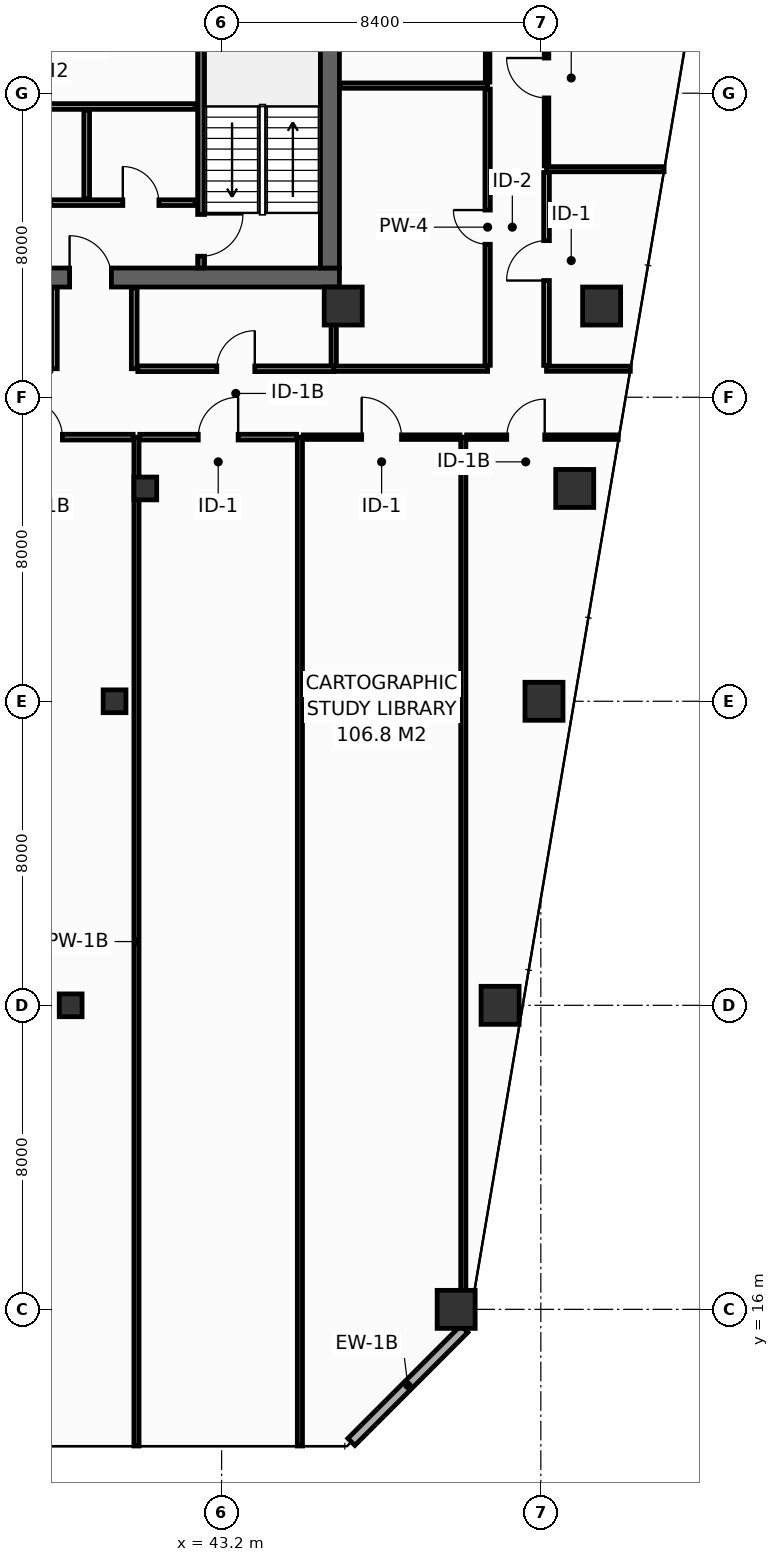
"""IFC4 building model, lengths in metres.
Left out: names, types, materials, properties, quantities, classifications, styles, units other than length and angle.
Written with IfcOpenShell. Run it as: python <this file> out.ifc"""

import sys

from ifc_helpers import new_model, si_unit, direction, frame, frame_2d, origin, origin_2d, place, context, subcontext, project, spatial, rectangle, hollow_rectangle, extrude, element, fill, save


model = new_model("IFC4")
c1 = context("Model", 3, precision=1e-05, world=origin(), true_north=direction((0.0, 1.0)))
c2 = subcontext(c1, "Body", "Model", "MODEL_VIEW")
j1 = project(units=[si_unit("LENGTHUNIT", "METRE"), si_unit("PLANEANGLEUNIT", "RADIAN")], contexts=[c1])
p1 = place(None, origin())
s1 = spatial("IfcSite", under=j1, at=p1, CompositionType="ELEMENT")
p2 = place(p1, origin())
s2 = spatial("IfcBuilding", under=s1, at=p2, CompositionType="ELEMENT")
p3 = place(p2, frame((0.0, 0.0, 175.2)))
s3 = spatial("IfcBuildingStorey", under=s2, at=p3, CompositionType="ELEMENT", Elevation=175.2)
p4 = place(p3, frame((13.6, 43.15, 0.0), z_axis=(0.0, 0.0, 1.0), x_axis=(1.0, 0.0, 0.0)))
e1 = element("IfcWall", 1, at=p4, inside=s3, PredefinedType="SHEAR", context=c2, shape_type="SweptSolid", body=[
    extrude(rectangle(XDim=32.7, YDim=0.5, at=frame_2d((16.35, 0.0))), origin(), (0.0, 0.0, 1.0), 3.55),
])
p5 = place(p4, frame((5.4, 0.0, 0.0)))
e2 = element("IfcOpeningElement", 2, at=p5, cuts=e1, PredefinedType="OPENING", context=c2, shape_type="SweptSolid", body=[
    extrude(rectangle(XDim=1.1, YDim=2.15, at=frame_2d((0.55, 1.075))), frame((0.0, 0.26, 0.0), z_axis=(0.0, -1.0, 0.0), x_axis=(1.0, 0.0, 0.0)), (0.0, 0.0, 1.0), 0.52),
])
p6 = place(p4, frame((25.6, 0.0, 0.0)))
e3 = element("IfcOpeningElement", 3, at=p6, cuts=e1, PredefinedType="OPENING", context=c2, shape_type="SweptSolid", body=[
    extrude(rectangle(XDim=1.1, YDim=2.15, at=frame_2d((0.55, 1.075))), frame((0.0, 0.26, 0.0), z_axis=(0.0, -1.0, 0.0), x_axis=(1.0, 0.0, 0.0)), (0.0, 0.0, 1.0), 0.52),
])
p7 = place(p3, frame((46.05, 43.4, 0.0), z_axis=(0.0, 0.0, 1.0), x_axis=(0.0, 1.0, 0.0)))
e4 = element("IfcWall", 4, at=p7, inside=s3, PredefinedType="SHEAR", context=c2, shape_type="SweptSolid", body=[
    extrude(rectangle(XDim=10.4, YDim=0.5, at=frame_2d((5.2, 0.0))), origin(), (0.0, 0.0, 1.0), 3.55),
])
for number, where, z_axis, x_axis in (
    (5, (46.4, 42.4, 0.0), (0.0, 0.0, 1.0), (1.0, 0.0, 0.0)),
    (6, (53.2, 42.4, 0.0), (0.0, 0.0, 1.0), (1.0, 0.0, 0.0)),
    (7, (49.372, 16.0, 0.0), (0.0, 0.0, 1.0), (1.0, 0.0, 0.0)),
    (8, (50.528, 24.0, 0.0), (0.0, 0.0, 1.0), (1.0, 0.0, 0.0)),
):
    element("IfcColumn", number, at=place(p3, frame(where, z_axis=z_axis, x_axis=x_axis)), inside=s3, PredefinedType="COLUMN", context=c2, shape_type="SweptSolid", body=[
        extrude(hollow_rectangle(XDim=1.0, YDim=1.0, WallThickness=0.045, at=origin_2d()), origin(), (0.0, 0.0, 1.0), 3.8),
    ])
p8 = place(p3, frame((39.228, 24.0, 0.0), z_axis=(0.0, 0.0, 1.0), x_axis=(1.0, 0.0, 0.0)))
e9 = element("IfcColumn", 9, at=p8, inside=s3, PredefinedType="COLUMN", context=c2, shape_type="SweptSolid", body=[
    extrude(hollow_rectangle(XDim=0.6, YDim=0.6, WallThickness=0.028, at=origin_2d()), origin(), (0.0, 0.0, 1.0), 3.8),
])
p9 = place(p3, frame((51.683, 32.0, 0.0), z_axis=(0.0, 0.0, 1.0), x_axis=(1.0, 0.0, 0.0)))
e10 = element("IfcColumn", 10, at=p9, inside=s3, PredefinedType="COLUMN", context=c2, shape_type="SweptSolid", body=[
    extrude(hollow_rectangle(XDim=1.0, YDim=1.0, WallThickness=0.045, at=origin_2d()), origin(), (0.0, 0.0, 1.0), 3.8),
])
p10 = place(p3, frame((40.383, 32.0, 0.0), z_axis=(0.0, 0.0, 1.0), x_axis=(1.0, 0.0, 0.0)))
e11 = element("IfcColumn", 11, at=p10, inside=s3, PredefinedType="COLUMN", context=c2, shape_type="SweptSolid", body=[
    extrude(hollow_rectangle(XDim=0.6, YDim=0.6, WallThickness=0.028, at=origin_2d()), origin(), (0.0, 0.0, 1.0), 3.8),
])
p11 = place(p3, frame((52.492, 37.6, 0.0), z_axis=(0.0, 0.0, 1.0), x_axis=(1.0, 0.0, 0.0)))
e12 = element("IfcColumn", 12, at=p11, inside=s3, PredefinedType="COLUMN", context=c2, shape_type="SweptSolid", body=[
    extrude(hollow_rectangle(XDim=1.0, YDim=1.0, WallThickness=0.045, at=origin_2d()), origin(), (0.0, 0.0, 1.0), 3.8),
])
p12 = place(p3, frame((41.192, 37.6, 0.0), z_axis=(0.0, 0.0, 1.0), x_axis=(1.0, 0.0, 0.0)))
e13 = element("IfcColumn", 13, at=p12, inside=s3, PredefinedType="COLUMN", context=c2, shape_type="SweptSolid", body=[
    extrude(hollow_rectangle(XDim=0.6, YDim=0.6, WallThickness=0.028, at=origin_2d()), origin(), (0.0, 0.0, 1.0), 3.8),
])
p13 = place(p3, frame((42.66, 53.8, 0.0), z_axis=(0.0, 0.0, 1.0), x_axis=(0.0, -1.0, 0.0)))
e14 = element("IfcWall", 14, at=p13, inside=s3, PredefinedType="SHEAR", context=c2, shape_type="SweptSolid", body=[
    extrude(rectangle(XDim=10.4, YDim=0.18, at=frame_2d((5.2, 0.0))), origin(), (0.0, 0.0, 1.0), 3.55),
])
p14 = place(p13, frame((8.99, 0.0, 0.0)))
e15 = element("IfcOpeningElement", 15, at=p14, cuts=e14, PredefinedType="OPENING", context=c2, shape_type="SweptSolid", body=[
    extrude(rectangle(XDim=1.1, YDim=2.15, at=frame_2d((0.55, 1.075))), frame((0.0, 0.1, 0.0), z_axis=(0.0, -1.0, 0.0), x_axis=(1.0, 0.0, 0.0)), (0.0, 0.0, 1.0), 0.2),
])
p15 = place(p3, frame((33.95, 45.12, 0.0), z_axis=(0.0, 0.0, 1.0), x_axis=(1.0, 0.0, 0.0)))
e16 = element("IfcWall", 16, at=p15, inside=s3, PredefinedType="PARTITIONING", context=c2, shape_type="SweptSolid", body=[
    extrude(rectangle(XDim=8.55, YDim=0.15, at=frame_2d((4.275, 0.0))), origin(), (0.0, 0.0, 1.0), 3.55),
])
p16 = place(p15, frame((0.95, 0.0, 0.0)))
e17 = element("IfcOpeningElement", 17, at=p16, cuts=e16, PredefinedType="OPENING", context=c2, shape_type="SweptSolid", body=[
    extrude(rectangle(XDim=0.95, YDim=2.15, at=frame_2d((0.475, 1.075))), frame((0.0, 0.085, 0.0), z_axis=(0.0, -1.0, 0.0), x_axis=(1.0, 0.0, 0.0)), (0.0, 0.0, 1.0), 0.17),
])
p17 = place(p15, frame((3.8, 0.0, 0.0)))
e18 = element("IfcOpeningElement", 18, at=p17, cuts=e16, PredefinedType="OPENING", context=c2, shape_type="SweptSolid", body=[
    extrude(rectangle(XDim=0.95, YDim=2.15, at=frame_2d((0.475, 1.075))), frame((0.0, 0.085, 0.0), z_axis=(0.0, -1.0, 0.0), x_axis=(1.0, 0.0, 0.0)), (0.0, 0.0, 1.0), 0.17),
])
p18 = place(p15, frame((6.65, 0.0, 0.0)))
e19 = element("IfcOpeningElement", 19, at=p18, cuts=e16, PredefinedType="OPENING", context=c2, shape_type="SweptSolid", body=[
    extrude(rectangle(XDim=0.95, YDim=2.15, at=frame_2d((0.475, 1.075))), frame((0.0, 0.085, 0.0), z_axis=(0.0, -1.0, 0.0), x_axis=(1.0, 0.0, 0.0)), (0.0, 0.0, 1.0), 0.17),
])
p19 = place(p3, frame((33.95, 47.65, 0.0), z_axis=(0.0, 0.0, 1.0), x_axis=(1.0, 0.0, 0.0)))
e20 = element("IfcWall", 20, at=p19, inside=s3, PredefinedType="PARTITIONING", context=c2, shape_type="SweptSolid", body=[
    extrude(rectangle(XDim=8.55, YDim=0.15, at=frame_2d((4.275, 0.0))), origin(), (0.0, 0.0, 1.0), 3.55),
])
p20 = place(p3, frame((39.65, 45.22, 0.0), z_axis=(0.0, 0.0, 1.0), x_axis=(0.0, 1.0, 0.0)))
e21 = element("IfcWall", 21, at=p20, inside=s3, PredefinedType="PARTITIONING", context=c2, shape_type="SweptSolid", body=[
    extrude(rectangle(XDim=2.33, YDim=0.15, at=frame_2d((1.165, 0.0))), origin(), (0.0, 0.0, 1.0), 3.55),
])
p21 = place(p3, frame((46.615, 12.513, 0.0), z_axis=(0.0, 0.0, 1.0), x_axis=(0.707135806771, 0.70707775441, 0.0)))
e22 = element("IfcWall", 22, at=p21, inside=s3, PredefinedType="STANDARD", context=c2, shape_type="SweptSolid", body=[
    extrude(rectangle(XDim=4.206, YDim=0.26, at=frame_2d((2.103, 0.0))), origin(), (0.0, 0.0, 1.0), 3.55),
])
p22 = place(p3, frame((46.15, 40.75, 0.0), z_axis=(0.0, 0.0, 1.0), x_axis=(1.0, 0.0, 0.0)))
e23 = element("IfcWall", 23, at=p22, inside=s3, PredefinedType="PARTITIONING", context=c2, shape_type="SweptSolid", body=[
    extrude(rectangle(XDim=4.05, YDim=0.14, at=frame_2d((2.025, 0.0))), origin(), (0.0, 0.0, 1.0), 3.55),
])
p23 = place(p3, frame((46.15, 40.84, 0.0), z_axis=(0.0, 0.0, 1.0), x_axis=(0.0, 1.0, 0.0)))
e24 = element("IfcWall", 24, at=p23, inside=s3, PredefinedType="PARTITIONING", context=c2, shape_type="SweptSolid", body=[
    extrude(rectangle(XDim=2.04, YDim=0.14, at=frame_2d((1.02, 0.0))), origin(), (0.0, 0.0, 1.0), 3.55),
])
p24 = place(p3, frame((46.32, 48.2, 0.0), z_axis=(0.0, 0.0, 1.0), x_axis=(1.0, 0.0, 0.0)))
e25 = element("IfcWall", 25, at=p24, inside=s3, PredefinedType="PARTITIONING", context=c2, shape_type="SweptSolid", body=[
    extrude(rectangle(XDim=3.88, YDim=0.14, at=frame_2d((1.94, 0.0))), origin(), (0.0, 0.0, 1.0), 3.55),
])
p25 = place(p3, frame((50.2, 40.84, 0.0), z_axis=(0.0, 0.0, 1.0), x_axis=(0.0, 1.0, 0.0)))
e26 = element("IfcWall", 26, at=p25, inside=s3, PredefinedType="PARTITIONING", context=c2, shape_type="SweptSolid", body=[
    extrude(rectangle(XDim=7.27, YDim=0.14, at=frame_2d((3.635, 0.0))), origin(), (0.0, 0.0, 1.0), 2.835),
])
p26 = place(p25, frame((3.185, 0.0, 0.0)))
e27 = element("IfcOpeningElement", 27, at=p26, cuts=e26, PredefinedType="OPENING", context=c2, shape_type="SweptSolid", body=[
    extrude(rectangle(XDim=0.9, YDim=2.1, at=frame_2d((0.45, 1.05))), frame((0.0, 0.08, 0.0), z_axis=(0.0, -1.0, 0.0), x_axis=(1.0, 0.0, 0.0)), (0.0, 0.0, 1.0), 0.16),
])
p27 = place(p3, frame((50.2, 48.29, 0.0), z_axis=(0.0, 0.0, 1.0), x_axis=(0.0, 1.0, 0.0)))
e28 = element("IfcWall", 28, at=p27, inside=s3, PredefinedType="PARTITIONING", context=c2, shape_type="SweptSolid", body=[
    extrude(rectangle(XDim=3.98, YDim=0.12, at=frame_2d((1.99, 0.0))), origin(), (0.0, 0.0, 1.0), 3.55),
])
p28 = place(p27, frame((1.54, 0.0, 0.0)))
e29 = element("IfcOpeningElement", 29, at=p28, cuts=e28, PredefinedType="OPENING", context=c2, shape_type="SweptSolid", body=[
    extrude(rectangle(XDim=0.9, YDim=2.1, at=frame_2d((0.45, 1.05))), frame((0.0, 0.07, 0.0), z_axis=(0.0, -1.0, 0.0), x_axis=(1.0, 0.0, 0.0)), (0.0, 0.0, 1.0), 0.14),
])
p29 = place(p3, frame((51.75, 40.75, 0.0), z_axis=(0.0, 0.0, 1.0), x_axis=(1.0, 0.0, 0.0)))
e30 = element("IfcWall", 30, at=p29, inside=s3, PredefinedType="PARTITIONING", context=c2, shape_type="SweptSolid", body=[
    extrude(rectangle(XDim=2.205, YDim=0.135, at=frame_2d((1.103, 0.0))), origin(), (0.0, 0.0, 1.0), 3.035),
])
p30 = place(p3, frame((51.75, 46.0, 0.0), z_axis=(0.0, 0.0, 1.0), x_axis=(1.0, 0.0, 0.0)))
e31 = element("IfcWall", 31, at=p30, inside=s3, PredefinedType="PARTITIONING", context=c2, shape_type="SweptSolid", body=[
    extrude(rectangle(XDim=3.094, YDim=0.135, at=frame_2d((1.547, 0.0))), origin(), (0.0, 0.0, 1.0), 2.835),
])
p31 = place(p3, frame((51.75, 40.837, 0.0), z_axis=(0.0, 0.0, 1.0), x_axis=(0.0, 1.0, 0.0)))
e32 = element("IfcWall", 32, at=p31, inside=s3, PredefinedType="PARTITIONING", context=c2, shape_type="SweptSolid", body=[
    extrude(rectangle(XDim=5.075, YDim=0.15, at=frame_2d((2.538, 0.0))), origin(), (0.0, 0.0, 1.0), 2.835),
])
p32 = place(p31, frame((2.233, 0.0, 0.0)))
e33 = element("IfcOpeningElement", 33, at=p32, cuts=e32, PredefinedType="OPENING", context=c2, shape_type="SweptSolid", body=[
    extrude(rectangle(XDim=1.05, YDim=2.15, at=frame_2d((0.525, 1.075))), frame((0.0, 0.085, 0.0), z_axis=(0.0, -1.0, 0.0), x_axis=(1.0, 0.0, 0.0)), (0.0, 0.0, 1.0), 0.17),
])
p33 = place(p3, frame((51.75, 46.087, 0.0), z_axis=(0.0, 0.0, 1.0), x_axis=(0.0, 1.0, 0.0)))
e34 = element("IfcWall", 34, at=p33, inside=s3, PredefinedType="PARTITIONING", context=c2, shape_type="SweptSolid", body=[
    extrude(rectangle(XDim=4.625, YDim=0.12, at=frame_2d((2.312, 0.0))), origin(), (0.0, 0.0, 1.0), 3.55),
])
p34 = place(p33, frame((1.788, 0.0, 0.0)))
e35 = element("IfcOpeningElement", 35, at=p34, cuts=e34, PredefinedType="OPENING", context=c2, shape_type="SweptSolid", body=[
    extrude(rectangle(XDim=1.05, YDim=2.15, at=frame_2d((0.525, 1.075))), frame((0.0, 0.07, 0.0), z_axis=(0.0, -1.0, 0.0), x_axis=(1.0, 0.0, 0.0)), (0.0, 0.0, 1.0), 0.14),
])
for number, where, z_axis, x_axis in (
    (36, (38.8, 40.75, 0.0), (0.0, 0.0, 1.0), (0.0, 1.0, 0.0)),
    (37, (40.9, 40.75, 0.0), (0.0, 0.0, 1.0), (0.0, 1.0, 0.0)),
):
    element("IfcWall", number, at=place(p3, frame(where, z_axis=z_axis, x_axis=x_axis)), inside=s3, PredefinedType="PARTITIONING", context=c2, shape_type="SweptSolid", body=[
        extrude(rectangle(XDim=2.13, YDim=0.15, at=frame_2d((1.065, 0.0))), origin(), (0.0, 0.0, 1.0), 3.55),
    ])
p35 = place(p3, frame((40.995, 40.75, 0.0), z_axis=(0.0, 0.0, 1.0), x_axis=(1.0, 0.0, 0.0)))
e38 = element("IfcWall", 38, at=p35, inside=s3, PredefinedType="PARTITIONING", context=c2, shape_type="SweptSolid", body=[
    extrude(rectangle(XDim=5.155, YDim=0.15, at=frame_2d((2.577, 0.0))), origin(), (0.0, 0.0, 1.0), 3.55),
])
p36 = place(p35, frame((2.078, 0.0, 0.0)))
e39 = element("IfcOpeningElement", 39, at=p36, cuts=e38, PredefinedType="OPENING", context=c2, shape_type="SweptSolid", body=[
    extrude(rectangle(XDim=1.0, YDim=2.15, at=frame_2d((0.5, 1.075))), frame((0.0, 0.085, 0.0), z_axis=(0.0, -1.0, 0.0), x_axis=(1.0, 0.0, 0.0)), (0.0, 0.0, 1.0), 0.17),
])
for number, where, z_axis, x_axis in (
    (40, (40.96, 12.405, 0.0), (0.0, 0.0, 1.0), (0.0, 1.0, 0.0)),
    (41, (45.26, 12.405, 0.0), (0.0, 0.0, 1.0), (0.0, 1.0, 0.0)),
):
    element("IfcWall", number, at=place(p3, frame(where, z_axis=z_axis, x_axis=x_axis)), inside=s3, PredefinedType="PARTITIONING", context=c2, shape_type="SweptSolid", body=[
        extrude(rectangle(XDim=26.545, YDim=0.135, at=frame_2d((13.272, 0.0))), origin(), (0.0, 0.0, 1.0), 2.835),
    ])
p37 = place(p3, frame((49.56, 15.516, 0.0), z_axis=(0.0, 0.0, 1.0), x_axis=(0.0, 1.0, 0.0)))
e42 = element("IfcWall", 42, at=p37, inside=s3, PredefinedType="PARTITIONING", context=c2, shape_type="SweptSolid", body=[
    extrude(rectangle(XDim=23.434, YDim=0.135, at=frame_2d((11.717, 0.0))), origin(), (0.0, 0.0, 1.0), 2.835),
])
p38 = place(p3, frame((36.15, 38.95, 0.0), z_axis=(0.0, 0.0, 1.0), x_axis=(1.0, 0.0, 0.0)))
e43 = element("IfcWall", 43, at=p38, inside=s3, PredefinedType="PARTITIONING", context=c2, shape_type="SweptSolid", body=[
    extrude(rectangle(XDim=4.723, YDim=0.15, at=frame_2d((2.361, 0.0))), origin(), (0.0, 0.0, 1.0), 2.835),
])
p39 = place(p38, frame((1.861, 0.0, 0.0)))
e44 = element("IfcOpeningElement", 44, at=p39, cuts=e43, PredefinedType="OPENING", context=c2, shape_type="SweptSolid", body=[
    extrude(rectangle(XDim=1.0, YDim=2.15, at=frame_2d((0.5, 1.075))), frame((0.0, 0.085, 0.0), z_axis=(0.0, -1.0, 0.0), x_axis=(1.0, 0.0, 0.0)), (0.0, 0.0, 1.0), 0.17),
])
p40 = place(p3, frame((41.048, 38.95, 0.0), z_axis=(0.0, 0.0, 1.0), x_axis=(1.0, 0.0, 0.0)))
e45 = element("IfcWall", 45, at=p40, inside=s3, PredefinedType="PARTITIONING", context=c2, shape_type="SweptSolid", body=[
    extrude(rectangle(XDim=4.125, YDim=0.15, at=frame_2d((2.062, 0.0))), origin(), (0.0, 0.0, 1.0), 3.55),
])
p41 = place(p40, frame((1.538, 0.0, 0.0)))
e46 = element("IfcOpeningElement", 46, at=p41, cuts=e45, PredefinedType="OPENING", context=c2, shape_type="SweptSolid", body=[
    extrude(rectangle(XDim=1.05, YDim=2.15, at=frame_2d((0.525, 1.075))), frame((0.0, 0.085, 0.0), z_axis=(0.0, -1.0, 0.0), x_axis=(1.0, 0.0, 0.0)), (0.0, 0.0, 1.0), 0.17),
])
p42 = place(p3, frame((45.347, 38.95, 0.0), z_axis=(0.0, 0.0, 1.0), x_axis=(1.0, 0.0, 0.0)))
e47 = element("IfcWall", 47, at=p42, inside=s3, PredefinedType="PARTITIONING", context=c2, shape_type="SweptSolid", body=[
    extrude(rectangle(XDim=4.125, YDim=0.12, at=frame_2d((2.062, 0.0))), origin(), (0.0, 0.0, 1.0), 3.55),
])
p43 = place(p42, frame((1.538, 0.0, 0.0)))
e48 = element("IfcOpeningElement", 48, at=p43, cuts=e47, PredefinedType="OPENING", context=c2, shape_type="SweptSolid", body=[
    extrude(rectangle(XDim=1.05, YDim=2.15, at=frame_2d((0.525, 1.075))), frame((0.0, 0.07, 0.0), z_axis=(0.0, -1.0, 0.0), x_axis=(1.0, 0.0, 0.0)), (0.0, 0.0, 1.0), 0.14),
])
p44 = place(p3, frame((49.647, 38.95, 0.0), z_axis=(0.0, 0.0, 1.0), x_axis=(1.0, 0.0, 0.0)))
e49 = element("IfcWall", 49, at=p44, inside=s3, PredefinedType="PARTITIONING", context=c2, shape_type="SweptSolid", body=[
    extrude(rectangle(XDim=3.99, YDim=0.12, at=frame_2d((1.995, 0.0))), origin(), (0.0, 0.0, 1.0), 3.035),
])
p45 = place(p44, frame((1.055, 0.0, 0.0)))
e50 = element("IfcOpeningElement", 50, at=p45, cuts=e49, PredefinedType="OPENING", context=c2, shape_type="SweptSolid", body=[
    extrude(rectangle(XDim=1.0, YDim=2.15, at=frame_2d((0.5, 1.075))), frame((0.0, 0.07, 0.0), z_axis=(0.0, -1.0, 0.0), x_axis=(1.0, 0.0, 0.0)), (0.0, 0.0, 1.0), 0.14),
])
p46 = place(p14, origin())
e51 = element("IfcDoor", 51, at=p46, inside=s3, OperationType="SINGLE_SWING_LEFT", PredefinedType="DOOR", context=c2, shape_type="SweptSolid", body=[
    extrude(rectangle(XDim=1.1, YDim=2.15, at=frame_2d((0.55, 1.075))), frame((0.0, 0.025, 0.0), z_axis=(0.0, -1.0, 0.0), x_axis=(1.0, 0.0, 0.0)), (0.0, 0.0, 1.0), 0.05),
])
fill(e15, e51)
p47 = place(p6, origin())
e52 = element("IfcDoor", 52, at=p47, inside=s3, OperationType="SINGLE_SWING_LEFT", PredefinedType="DOOR", context=c2, shape_type="SweptSolid", body=[
    extrude(rectangle(XDim=1.1, YDim=2.15, at=frame_2d((0.55, 1.075))), frame((0.0, 0.025, 0.0), z_axis=(0.0, -1.0, 0.0), x_axis=(1.0, 0.0, 0.0)), (0.0, 0.0, 1.0), 0.05),
])
fill(e3, e52)
p48 = place(p18, origin())
e53 = element("IfcDoor", 53, at=p48, inside=s3, OperationType="SINGLE_SWING_LEFT", PredefinedType="DOOR", context=c2, shape_type="SweptSolid", body=[
    extrude(rectangle(XDim=0.95, YDim=2.15, at=frame_2d((0.475, 1.075))), frame((0.0, 0.025, 0.0), z_axis=(0.0, -1.0, 0.0), x_axis=(1.0, 0.0, 0.0)), (0.0, 0.0, 1.0), 0.05),
])
fill(e19, e53)
p49 = place(p26, origin())
e54 = element("IfcDoor", 54, at=p49, inside=s3, OperationType="SINGLE_SWING_RIGHT", PredefinedType="DOOR", context=c2, shape_type="SweptSolid", body=[
    extrude(rectangle(XDim=0.9, YDim=2.1, at=frame_2d((0.45, 1.05))), frame((0.0, 0.025, 0.0), z_axis=(0.0, -1.0, 0.0), x_axis=(1.0, 0.0, 0.0)), (0.0, 0.0, 1.0), 0.05),
])
fill(e27, e54)
p50 = place(p32, origin())
e55 = element("IfcDoor", 55, at=p50, inside=s3, OperationType="SINGLE_SWING_LEFT", PredefinedType="DOOR", context=c2, shape_type="SweptSolid", body=[
    extrude(rectangle(XDim=1.05, YDim=2.15, at=frame_2d((0.525, 1.075))), frame((0.0, 0.025, 0.0), z_axis=(0.0, -1.0, 0.0), x_axis=(1.0, 0.0, 0.0)), (0.0, 0.0, 1.0), 0.05),
])
fill(e33, e55)
p51 = place(p34, origin())
e56 = element("IfcDoor", 56, at=p51, inside=s3, OperationType="SINGLE_SWING_RIGHT", PredefinedType="DOOR", context=c2, shape_type="SweptSolid", body=[
    extrude(rectangle(XDim=1.05, YDim=2.15, at=frame_2d((0.525, 1.075))), frame((0.0, 0.025, 0.0), z_axis=(0.0, -1.0, 0.0), x_axis=(1.0, 0.0, 0.0)), (0.0, 0.0, 1.0), 0.05),
])
fill(e35, e56)
p52 = place(p36, origin())
e57 = element("IfcDoor", 57, at=p52, inside=s3, OperationType="SINGLE_SWING_RIGHT", PredefinedType="DOOR", context=c2, shape_type="SweptSolid", body=[
    extrude(rectangle(XDim=1.0, YDim=2.15, at=frame_2d((0.5, 1.075))), frame((0.0, 0.025, 0.0), z_axis=(0.0, -1.0, 0.0), x_axis=(1.0, 0.0, 0.0)), (0.0, 0.0, 1.0), 0.05),
])
fill(e39, e57)
p53 = place(p39, origin())
e58 = element("IfcDoor", 58, at=p53, inside=s3, OperationType="SINGLE_SWING_LEFT", PredefinedType="DOOR", context=c2, shape_type="SweptSolid", body=[
    extrude(rectangle(XDim=1.0, YDim=2.15, at=frame_2d((0.5, 1.075))), frame((0.0, 0.025, 0.0), z_axis=(0.0, -1.0, 0.0), x_axis=(1.0, 0.0, 0.0)), (0.0, 0.0, 1.0), 0.05),
])
fill(e44, e58)
p54 = place(p41, origin())
e59 = element("IfcDoor", 59, at=p54, inside=s3, OperationType="SINGLE_SWING_RIGHT", PredefinedType="DOOR", context=c2, shape_type="SweptSolid", body=[
    extrude(rectangle(XDim=1.05, YDim=2.15, at=frame_2d((0.525, 1.075))), frame((0.0, 0.025, 0.0), z_axis=(0.0, -1.0, 0.0), x_axis=(1.0, 0.0, 0.0)), (0.0, 0.0, 1.0), 0.05),
])
fill(e46, e59)
p55 = place(p43, origin())
e60 = element("IfcDoor", 60, at=p55, inside=s3, OperationType="SINGLE_SWING_LEFT", PredefinedType="DOOR", context=c2, shape_type="SweptSolid", body=[
    extrude(rectangle(XDim=1.05, YDim=2.15, at=frame_2d((0.525, 1.075))), frame((0.0, 0.025, 0.0), z_axis=(0.0, -1.0, 0.0), x_axis=(1.0, 0.0, 0.0)), (0.0, 0.0, 1.0), 0.05),
])
fill(e48, e60)
p56 = place(p45, origin())
e61 = element("IfcDoor", 61, at=p56, inside=s3, OperationType="SINGLE_SWING_RIGHT", PredefinedType="DOOR", context=c2, shape_type="SweptSolid", body=[
    extrude(rectangle(XDim=1.0, YDim=2.15, at=frame_2d((0.5, 1.075))), frame((0.0, 0.025, 0.0), z_axis=(0.0, -1.0, 0.0), x_axis=(1.0, 0.0, 0.0)), (0.0, 0.0, 1.0), 0.05),
])
fill(e50, e61)
save(model, sys.argv[1])
